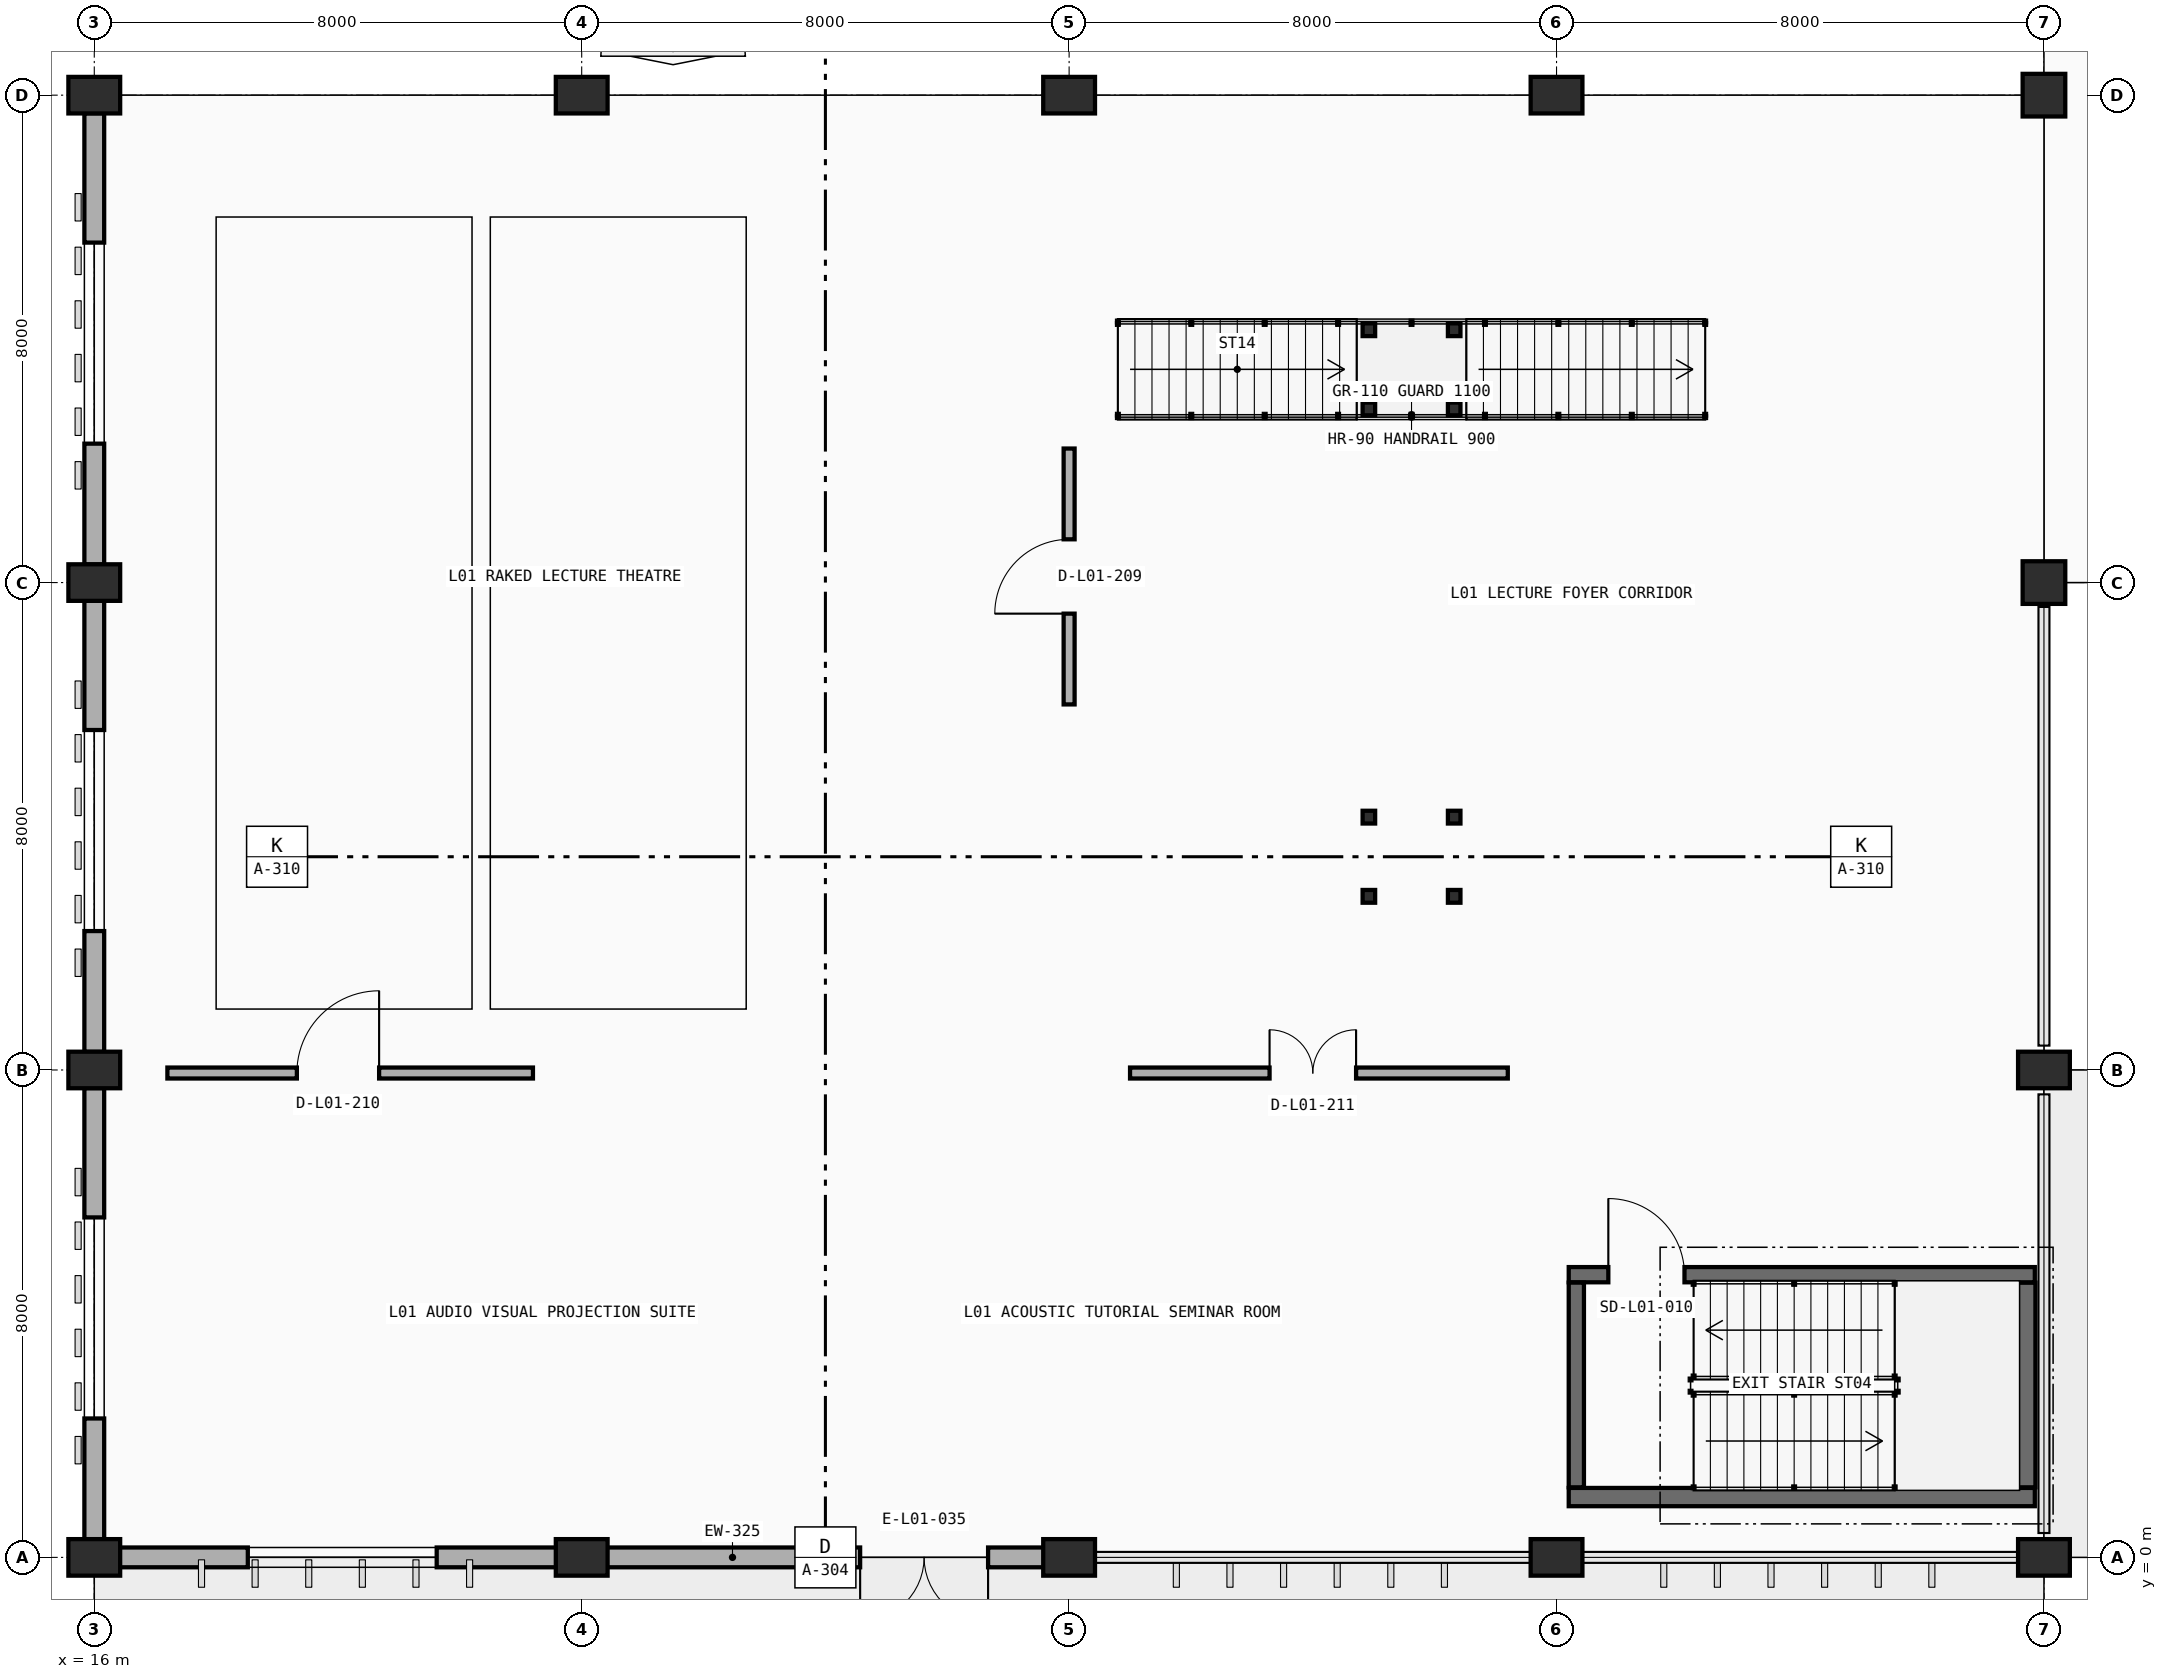
"""IFC4 building model, lengths in metres.
Left out: names, types, materials, properties, quantities, classifications, styles, units other than length and angle.
Written with IfcOpenShell. Run it as: python <this file> out.ifc"""

import sys

from ifc_helpers import new_model, si_unit, direction, frame, frame_2d, origin, origin_2d, place, context, subcontext, project, spatial, rectangle, i_section, extrude, element, fill, save


model = new_model("IFC4")
c1 = context("Model", 3, precision=1e-05, world=origin(), true_north=direction((0.0, 1.0)))
c2 = subcontext(c1, "Body", "Model", "MODEL_VIEW")
j1 = project(units=[si_unit("LENGTHUNIT", "METRE"), si_unit("PLANEANGLEUNIT", "RADIAN")], contexts=[c1])
p1 = place(None, origin())
s1 = spatial("IfcSite", under=j1, at=p1, CompositionType="ELEMENT")
p2 = place(p1, origin())
s2 = spatial("IfcBuilding", under=s1, at=p2, CompositionType="ELEMENT")
p3 = place(p2, origin())
s3 = spatial("IfcBuildingStorey", under=s2, at=p3, CompositionType="ELEMENT", Elevation=0.0)
for number, where, z_axis, x_axis in (
    (1, (16.0, 0.0, 0.0), (0.0, 0.0, 1.0), (0.0, 1.0, 0.0)),
    (2, (24.0, 0.0, 0.0), (0.0, 0.0, 1.0), (0.0, 1.0, 0.0)),
    (3, (32.0, 0.0, 0.0), (0.0, 0.0, 1.0), (0.0, 1.0, 0.0)),
    (4, (40.0, 0.0, 0.0), (0.0, 0.0, 1.0), (0.0, 1.0, 0.0)),
    (5, (48.0, 0.0, 0.0), (0.0, 0.0, 1.0), (0.0, 1.0, 0.0)),
    (6, (16.0, 8.0, 0.0), (0.0, 0.0, 1.0), (0.0, 1.0, 0.0)),
    (7, (48.0, 8.0, 0.0), (0.0, 0.0, 1.0), (0.0, 1.0, 0.0)),
    (8, (16.0, 16.0, 0.0), (0.0, 0.0, 1.0), (0.0, 1.0, 0.0)),
):
    element("IfcColumn", number, at=place(p3, frame(where, z_axis=z_axis, x_axis=x_axis)), inside=s3, PredefinedType="COLUMN", context=c2, shape_type="SweptSolid", body=[
        extrude(rectangle(XDim=0.6, YDim=0.85, at=origin_2d()), origin(), (0.0, 0.0, 1.0), 4.8),
    ])
p4 = place(p3, frame((48.0, 16.0, 0.0), z_axis=(0.0, 0.0, 1.0), x_axis=(1.0, 0.0, 0.0)))
e9 = element("IfcColumn", 9, at=p4, inside=s3, PredefinedType="COLUMN", context=c2, shape_type="SweptSolid", body=[
    extrude(rectangle(XDim=0.7, YDim=0.7, at=origin_2d()), origin(), (0.0, 0.0, 1.0), 4.8),
])
for number, where, z_axis, x_axis in (
    (10, (16.0, 24.0, 0.0), (0.0, 0.0, 1.0), (0.0, 1.0, 0.0)),
    (11, (24.0, 24.0, 0.0), (0.0, 0.0, 1.0), (0.0, 1.0, 0.0)),
    (12, (32.0, 24.0, 0.0), (0.0, 0.0, 1.0), (0.0, 1.0, 0.0)),
    (13, (40.0, 24.0, 0.0), (0.0, 0.0, 1.0), (0.0, 1.0, 0.0)),
):
    element("IfcColumn", number, at=place(p3, frame(where, z_axis=z_axis, x_axis=x_axis)), inside=s3, PredefinedType="COLUMN", context=c2, shape_type="SweptSolid", body=[
        extrude(rectangle(XDim=0.6, YDim=0.85, at=origin_2d()), origin(), (0.0, 0.0, 1.0), 4.8),
    ])
p5 = place(p3, frame((48.0, 24.0, 0.0), z_axis=(0.0, 0.0, 1.0), x_axis=(1.0, 0.0, 0.0)))
e14 = element("IfcColumn", 14, at=p5, inside=s3, PredefinedType="COLUMN", context=c2, shape_type="SweptSolid", body=[
    extrude(rectangle(XDim=0.7, YDim=0.7, at=origin_2d()), origin(), (0.0, 0.0, 1.0), 4.8),
])
for number, where, z_axis, x_axis in (
    (15, (36.92, 18.85, 0.0), (0.0, 0.0, 1.0), (1.0, 0.0, 0.0)),
    (16, (36.92, 20.15, 0.0), (0.0, 0.0, 1.0), (1.0, 0.0, 0.0)),
    (17, (38.32, 18.85, 0.0), (0.0, 0.0, 1.0), (1.0, 0.0, 0.0)),
    (18, (38.32, 20.15, 0.0), (0.0, 0.0, 1.0), (1.0, 0.0, 0.0)),
):
    element("IfcColumn", number, at=place(p3, frame(where, z_axis=z_axis, x_axis=x_axis)), inside=s3, PredefinedType="COLUMN", context=c2, shape_type="SweptSolid", body=[
        extrude(i_section(OverallWidth=0.206, OverallDepth=0.21, WebThickness=0.01, FlangeThickness=0.014, FilletRadius=0.01, at=origin_2d()), origin(), (0.0, 0.0, 1.0), 2.2),
    ])
for number, where, z_axis, x_axis in (
    (19, (36.92, 10.85, 0.0), (0.0, 0.0, 1.0), (1.0, 0.0, 0.0)),
    (20, (36.92, 12.15, 0.0), (0.0, 0.0, 1.0), (1.0, 0.0, 0.0)),
    (21, (38.32, 10.85, 0.0), (0.0, 0.0, 1.0), (1.0, 0.0, 0.0)),
    (22, (38.32, 12.15, 0.0), (0.0, 0.0, 1.0), (1.0, 0.0, 0.0)),
):
    element("IfcColumn", number, at=place(p3, frame(where, z_axis=z_axis, x_axis=x_axis)), inside=s3, PredefinedType="COLUMN", context=c2, shape_type="SweptSolid", body=[
        extrude(i_section(OverallWidth=0.206, OverallDepth=0.21, WebThickness=0.01, FlangeThickness=0.014, FilletRadius=0.01, at=origin_2d()), origin(), (0.0, 0.0, 1.0), 4.52),
    ])
p6 = place(p3, frame((32.331, 26.009, 0.01), z_axis=(0.0, 0.0, 1.0), x_axis=(-0.9807810487, -0.19511159502, 0.0)))
e23 = element("IfcWall", 23, at=p6, inside=s3, PredefinedType="PARAPET", context=c2, shape_type="SweptSolid", body=[
    extrude(rectangle(XDim=6.965, YDim=0.2, at=frame_2d((3.482, 0.0))), origin(), (0.0, 0.0, 1.0), 1.62),
])
p7 = place(p3, frame((25.5, 24.65, 0.49), z_axis=(0.0, 0.0, 1.0), x_axis=(-0.9807810487, 0.19511159502, 0.0)))
e24 = element("IfcWall", 24, at=p7, inside=s3, PredefinedType="PARAPET", context=c2, shape_type="SweptSolid", body=[
    extrude(rectangle(XDim=6.965, YDim=0.2, at=frame_2d((3.482, 0.0))), origin(), (0.0, 0.0, 1.0), 1.62),
])
p8 = place(p3, frame((23.62, 0.0, 0.0), z_axis=(0.0, 0.0, 1.0), x_axis=(-1.0, 0.0, 0.0)))
e25 = element("IfcWall", 25, at=p8, inside=s3, PredefinedType="STANDARD", context=c2, shape_type="SweptSolid", body=[
    extrude(rectangle(XDim=7.24, YDim=0.325, at=frame_2d((3.62, 0.0))), origin(), (0.0, 0.0, 1.0), 3.89),
])
p9 = place(p8, frame((2.0, 0.0, 0.95)))
e26 = element("IfcOpeningElement", 26, at=p9, cuts=e25, PredefinedType="OPENING", context=c2, shape_type="SweptSolid", body=[
    extrude(rectangle(XDim=3.1, YDim=1.6, at=frame_2d((1.55, 0.8))), frame((0.0, 0.173, 0.0), z_axis=(0.0, -1.0, 0.0), x_axis=(1.0, 0.0, 0.0)), (0.0, 0.0, 1.0), 0.345),
])
p10 = place(p3, frame((31.62, 0.0, 0.0), z_axis=(0.0, 0.0, 1.0), x_axis=(-1.0, 0.0, 0.0)))
e27 = element("IfcWall", 27, at=p10, inside=s3, PredefinedType="STANDARD", context=c2, shape_type="SweptSolid", body=[
    extrude(rectangle(XDim=7.24, YDim=0.325, at=frame_2d((3.62, 0.0))), origin(), (0.0, 0.0, 1.0), 3.89),
])
p11 = place(p10, frame((0.95, 0.0, 0.0)))
e28 = element("IfcOpeningElement", 28, at=p11, cuts=e27, PredefinedType="OPENING", context=c2, shape_type="SweptSolid", body=[
    extrude(rectangle(XDim=2.1, YDim=2.4, at=frame_2d((1.05, 1.2))), frame((0.0, 0.173, 0.0), z_axis=(0.0, -1.0, 0.0), x_axis=(1.0, 0.0, 0.0)), (0.0, 0.0, 1.0), 0.345),
])
p12 = place(p3, frame((16.0, 0.297, 0.0), z_axis=(0.0, 0.0, 1.0), x_axis=(0.0, 1.0, 0.0)))
e29 = element("IfcWall", 29, at=p12, inside=s3, PredefinedType="STANDARD", context=c2, shape_type="SweptSolid", body=[
    extrude(rectangle(XDim=7.406, YDim=0.325, at=frame_2d((3.703, 0.0))), origin(), (0.0, 0.0, 1.0), 3.59),
])
p13 = place(p12, frame((1.983, 0.0, 0.95)))
e30 = element("IfcOpeningElement", 30, at=p13, cuts=e29, PredefinedType="OPENING", context=c2, shape_type="SweptSolid", body=[
    extrude(rectangle(XDim=3.3, YDim=1.75, at=frame_2d((1.65, 0.875))), frame((0.0, 0.173, 0.0), z_axis=(0.0, -1.0, 0.0), x_axis=(1.0, 0.0, 0.0)), (0.0, 0.0, 1.0), 0.345),
])
p14 = place(p3, frame((16.0, 8.297, 0.0), z_axis=(0.0, 0.0, 1.0), x_axis=(0.0, 1.0, 0.0)))
e31 = element("IfcWall", 31, at=p14, inside=s3, PredefinedType="STANDARD", context=c2, shape_type="SweptSolid", body=[
    extrude(rectangle(XDim=7.406, YDim=0.325, at=frame_2d((3.703, 0.0))), origin(), (0.0, 0.0, 1.0), 3.59),
])
p15 = place(p14, frame((1.983, 0.0, 0.95)))
e32 = element("IfcOpeningElement", 32, at=p15, cuts=e31, PredefinedType="OPENING", context=c2, shape_type="SweptSolid", body=[
    extrude(rectangle(XDim=3.3, YDim=1.75, at=frame_2d((1.65, 0.875))), frame((0.0, 0.173, 0.0), z_axis=(0.0, -1.0, 0.0), x_axis=(1.0, 0.0, 0.0)), (0.0, 0.0, 1.0), 0.345),
])
p16 = place(p3, frame((16.0, 16.297, 0.0), z_axis=(0.0, 0.0, 1.0), x_axis=(0.0, 1.0, 0.0)))
e33 = element("IfcWall", 33, at=p16, inside=s3, PredefinedType="STANDARD", context=c2, shape_type="SweptSolid", body=[
    extrude(rectangle(XDim=7.406, YDim=0.325, at=frame_2d((3.703, 0.0))), origin(), (0.0, 0.0, 1.0), 3.59),
])
p17 = place(p16, frame((1.983, 0.0, 0.95)))
e34 = element("IfcOpeningElement", 34, at=p17, cuts=e33, PredefinedType="OPENING", context=c2, shape_type="SweptSolid", body=[
    extrude(rectangle(XDim=3.3, YDim=1.75, at=frame_2d((1.65, 0.875))), frame((0.0, 0.173, 0.0), z_axis=(0.0, -1.0, 0.0), x_axis=(1.0, 0.0, 0.0)), (0.0, 0.0, 1.0), 0.345),
])
p18 = place(p3, frame((40.2, 0.99, 0.0), z_axis=(0.0, 0.0, 1.0), x_axis=(1.0, 0.0, 0.0)))
e35 = element("IfcWall", 35, at=p18, inside=s3, PredefinedType="SHEAR", context=c2, shape_type="SweptSolid", body=[
    extrude(rectangle(XDim=7.65, YDim=0.3, at=frame_2d((3.825, 0.0))), origin(), (0.0, 0.0, 1.0), 4.8),
])
p19 = place(p3, frame((47.71, 1.15, 0.0), z_axis=(0.0, 0.0, 1.0), x_axis=(0.0, 1.0, 0.0)))
e36 = element("IfcWall", 36, at=p19, inside=s3, PredefinedType="SHEAR", context=c2, shape_type="SweptSolid", body=[
    extrude(rectangle(XDim=3.36, YDim=0.3, at=frame_2d((1.68, 0.0))), origin(), (0.0, 0.0, 1.0), 4.8),
])
p20 = place(p3, frame((40.2, 4.64, 0.0), z_axis=(0.0, 0.0, 1.0), x_axis=(1.0, 0.0, 0.0)))
e37 = element("IfcWall", 37, at=p20, inside=s3, PredefinedType="SOLIDWALL", context=c2, shape_type="SweptSolid", body=[
    extrude(rectangle(XDim=7.65, YDim=0.25, at=frame_2d((3.825, 0.0))), origin(), (0.0, 0.0, 1.0), 4.8),
])
p21 = place(p20, frame((0.65, 0.0, 0.0)))
e38 = element("IfcOpeningElement", 38, at=p21, cuts=e37, PredefinedType="OPENING", context=c2, shape_type="SweptSolid", body=[
    extrude(rectangle(XDim=1.25, YDim=2.15, at=frame_2d((0.625, 1.075))), frame((0.0, 0.135, 0.0), z_axis=(0.0, -1.0, 0.0), x_axis=(1.0, 0.0, 0.0)), (0.0, 0.0, 1.0), 0.27),
])
p22 = place(p3, frame((40.325, 1.15, 0.0), z_axis=(0.0, 0.0, 1.0), x_axis=(0.0, 1.0, 0.0)))
e39 = element("IfcWall", 39, at=p22, inside=s3, PredefinedType="SOLIDWALL", context=c2, shape_type="SweptSolid", body=[
    extrude(rectangle(XDim=3.36, YDim=0.25, at=frame_2d((1.68, 0.0))), origin(), (0.0, 0.0, 1.0), 4.8),
])
p23 = place(p3, frame((32.0, 14.0, 0.0), z_axis=(0.0, 0.0, 1.0), x_axis=(0.0, 1.0, 0.0)))
e40 = element("IfcWall", 40, at=p23, inside=s3, PredefinedType="PARTITIONING", context=c2, shape_type="SweptSolid", body=[
    extrude(rectangle(XDim=4.2, YDim=0.18, at=frame_2d((2.1, 0.0))), origin(), (0.0, 0.0, 1.0), 3.655),
])
p24 = place(p23, frame((1.49, 0.0, 0.0)))
e41 = element("IfcOpeningElement", 41, at=p24, cuts=e40, PredefinedType="OPENING", context=c2, shape_type="SweptSolid", body=[
    extrude(rectangle(XDim=1.22, YDim=2.18, at=frame_2d((0.61, 1.09))), frame((0.0, 0.1, 0.0), z_axis=(0.0, -1.0, 0.0), x_axis=(1.0, 0.0, 0.0)), (0.0, 0.0, 1.0), 0.2),
])
p25 = place(p3, frame((17.2, 7.95, 0.0), z_axis=(0.0, 0.0, 1.0), x_axis=(1.0, 0.0, 0.0)))
e42 = element("IfcWall", 42, at=p25, inside=s3, PredefinedType="PARTITIONING", context=c2, shape_type="SweptSolid", body=[
    extrude(rectangle(XDim=6.0, YDim=0.18, at=frame_2d((3.0, 0.0))), origin(), (0.0, 0.0, 1.0), 3.9),
])
p26 = place(p25, frame((2.125, 0.0, 0.0)))
e43 = element("IfcOpeningElement", 43, at=p26, cuts=e42, PredefinedType="OPENING", context=c2, shape_type="SweptSolid", body=[
    extrude(rectangle(XDim=1.35, YDim=2.2, at=frame_2d((0.675, 1.1))), frame((0.0, 0.1, 0.0), z_axis=(0.0, -1.0, 0.0), x_axis=(1.0, 0.0, 0.0)), (0.0, 0.0, 1.0), 0.2),
])
p27 = place(p3, frame((33.0, 7.95, 0.0), z_axis=(0.0, 0.0, 1.0), x_axis=(1.0, 0.0, 0.0)))
e44 = element("IfcWall", 44, at=p27, inside=s3, PredefinedType="PARTITIONING", context=c2, shape_type="SweptSolid", body=[
    extrude(rectangle(XDim=6.2, YDim=0.18, at=frame_2d((3.1, 0.0))), origin(), (0.0, 0.0, 1.0), 3.9),
])
p28 = place(p27, frame((2.29, 0.0, 0.0)))
e45 = element("IfcOpeningElement", 45, at=p28, cuts=e44, PredefinedType="OPENING", context=c2, shape_type="SweptSolid", body=[
    extrude(rectangle(XDim=1.42, YDim=2.2, at=frame_2d((0.71, 1.1))), frame((0.0, 0.1, 0.0), z_axis=(0.0, -1.0, 0.0), x_axis=(1.0, 0.0, 0.0)), (0.0, 0.0, 1.0), 0.2),
])
p29 = place(p9, origin())
e46 = element("IfcWindow", 46, at=p29, inside=s3, PartitioningType="DOUBLE_PANEL_VERTICAL", PredefinedType="WINDOW", context=c2, shape_type="SweptSolid", body=[
    extrude(rectangle(XDim=3.1, YDim=1.6, at=frame_2d((1.55, 0.8))), frame((0.0, 0.03, 0.0), z_axis=(0.0, -1.0, 0.0), x_axis=(1.0, 0.0, 0.0)), (0.0, 0.0, 1.0), 0.06),
])
fill(e26, e46)
p30 = place(p11, origin())
e47 = element("IfcDoor", 47, at=p30, inside=s3, OperationType="DOUBLE_DOOR_SINGLE_SWING", PredefinedType="DOOR", context=c2, shape_type="SweptSolid", body=[
    extrude(rectangle(XDim=2.1, YDim=2.4, at=frame_2d((1.05, 1.2))), frame((0.0, 0.025, 0.0), z_axis=(0.0, -1.0, 0.0), x_axis=(1.0, 0.0, 0.0)), (0.0, 0.0, 1.0), 0.05),
])
fill(e28, e47)
p31 = place(p13, origin())
e48 = element("IfcWindow", 48, at=p31, inside=s3, PartitioningType="DOUBLE_PANEL_VERTICAL", PredefinedType="WINDOW", context=c2, shape_type="SweptSolid", body=[
    extrude(rectangle(XDim=3.3, YDim=1.75, at=frame_2d((1.65, 0.875))), frame((0.0, 0.03, 0.0), z_axis=(0.0, -1.0, 0.0), x_axis=(1.0, 0.0, 0.0)), (0.0, 0.0, 1.0), 0.06),
])
fill(e30, e48)
p32 = place(p15, origin())
e49 = element("IfcWindow", 49, at=p32, inside=s3, PartitioningType="DOUBLE_PANEL_VERTICAL", PredefinedType="WINDOW", context=c2, shape_type="SweptSolid", body=[
    extrude(rectangle(XDim=3.3, YDim=1.75, at=frame_2d((1.65, 0.875))), frame((0.0, 0.03, 0.0), z_axis=(0.0, -1.0, 0.0), x_axis=(1.0, 0.0, 0.0)), (0.0, 0.0, 1.0), 0.06),
])
fill(e32, e49)
p33 = place(p17, origin())
e50 = element("IfcWindow", 50, at=p33, inside=s3, PartitioningType="DOUBLE_PANEL_VERTICAL", PredefinedType="WINDOW", context=c2, shape_type="SweptSolid", body=[
    extrude(rectangle(XDim=3.3, YDim=1.75, at=frame_2d((1.65, 0.875))), frame((0.0, 0.03, 0.0), z_axis=(0.0, -1.0, 0.0), x_axis=(1.0, 0.0, 0.0)), (0.0, 0.0, 1.0), 0.06),
])
fill(e34, e50)
p34 = place(p21, origin())
e51 = element("IfcDoor", 51, at=p34, inside=s3, OperationType="SINGLE_SWING_LEFT", PredefinedType="DOOR", context=c2, shape_type="SweptSolid", body=[
    extrude(rectangle(XDim=1.25, YDim=2.15, at=frame_2d((0.625, 1.075))), frame((0.0, 0.025, 0.0), z_axis=(0.0, -1.0, 0.0), x_axis=(1.0, 0.0, 0.0)), (0.0, 0.0, 1.0), 0.05),
])
fill(e38, e51)
p35 = place(p24, origin())
e52 = element("IfcDoor", 52, at=p35, inside=s3, OperationType="SINGLE_SWING_LEFT", PredefinedType="DOOR", context=c2, shape_type="SweptSolid", body=[
    extrude(rectangle(XDim=1.22, YDim=2.18, at=frame_2d((0.61, 1.09))), frame((0.0, 0.025, 0.0), z_axis=(0.0, -1.0, 0.0), x_axis=(1.0, 0.0, 0.0)), (0.0, 0.0, 1.0), 0.05),
])
fill(e41, e52)
p36 = place(p26, origin())
e53 = element("IfcDoor", 53, at=p36, inside=s3, OperationType="SINGLE_SWING_RIGHT", PredefinedType="DOOR", context=c2, shape_type="SweptSolid", body=[
    extrude(rectangle(XDim=1.35, YDim=2.2, at=frame_2d((0.675, 1.1))), frame((0.0, 0.025, 0.0), z_axis=(0.0, -1.0, 0.0), x_axis=(1.0, 0.0, 0.0)), (0.0, 0.0, 1.0), 0.05),
])
fill(e43, e53)
p37 = place(p28, origin())
e54 = element("IfcDoor", 54, at=p37, inside=s3, OperationType="DOUBLE_DOOR_SINGLE_SWING", PredefinedType="DOOR", context=c2, shape_type="SweptSolid", body=[
    extrude(rectangle(XDim=1.42, YDim=2.2, at=frame_2d((0.71, 1.1))), frame((0.0, 0.025, 0.0), z_axis=(0.0, -1.0, 0.0), x_axis=(1.0, 0.0, 0.0)), (0.0, 0.0, 1.0), 0.05),
])
fill(e45, e54)
save(model, sys.argv[1])
